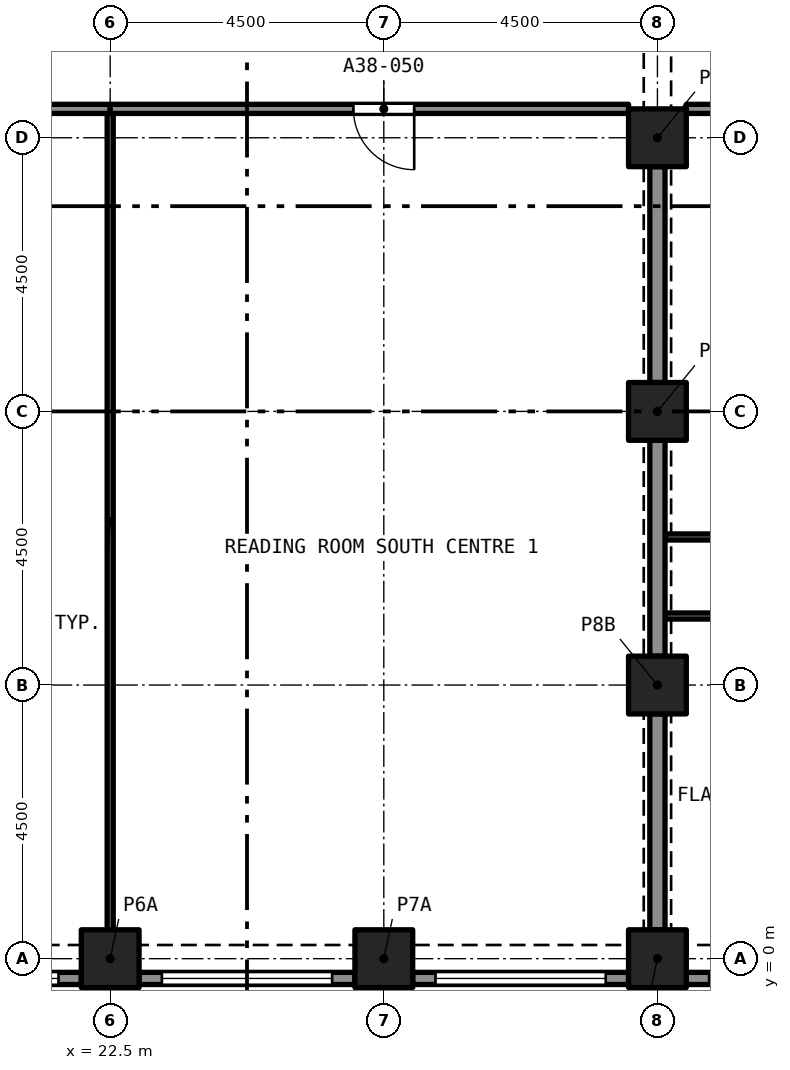
"""IFC4 building model, lengths in metres.
Left out: names, types, materials, properties, quantities, classifications, styles, units other than length and angle.
Written with IfcOpenShell. Run it as: python <this file> out.ifc"""

import sys

from ifc_helpers import new_model, si_unit, direction, frame, frame_2d, origin, origin_2d, place, context, subcontext, project, spatial, rectangle, extrude, element, fill, save


model = new_model("IFC4")
c1 = context("Model", 3, precision=1e-05, world=origin(), true_north=direction((0.0, 1.0)))
c2 = subcontext(c1, "Body", "Model", "MODEL_VIEW")
j1 = project(units=[si_unit("LENGTHUNIT", "METRE"), si_unit("PLANEANGLEUNIT", "RADIAN")], contexts=[c1])
p1 = place(None, origin())
s1 = spatial("IfcSite", under=j1, at=p1, CompositionType="ELEMENT")
p2 = place(p1, origin())
s2 = spatial("IfcBuilding", under=s1, at=p2, CompositionType="ELEMENT")
p3 = place(p2, frame((0.0, 0.0, 136.6)))
s3 = spatial("IfcBuildingStorey", under=s2, at=p3, CompositionType="ELEMENT", Elevation=136.6)
for number, where, z_axis, x_axis in (
    (1, (22.5, 0.0, 0.0), (0.0, 0.0, 1.0), (1.0, 0.0, 0.0)),
    (2, (27.0, 0.0, 0.0), (0.0, 0.0, 1.0), (1.0, 0.0, 0.0)),
    (3, (31.5, 0.0, 0.0), (0.0, 0.0, 1.0), (1.0, 0.0, 0.0)),
    (4, (31.5, 4.5, 0.0), (0.0, 0.0, 1.0), (1.0, 0.0, 0.0)),
    (5, (31.5, 9.0, 0.0), (0.0, 0.0, 1.0), (1.0, 0.0, 0.0)),
    (6, (31.5, 13.5, 0.0), (0.0, 0.0, 1.0), (1.0, 0.0, 0.0)),
):
    element("IfcColumn", number, at=place(p3, frame(where, z_axis=z_axis, x_axis=x_axis)), inside=s3, PredefinedType="COLUMN", context=c2, shape_type="SweptSolid", body=[
        extrude(rectangle(XDim=0.95, YDim=0.95, at=origin_2d()), origin(), (0.0, 0.0, 1.0), 3.2),
    ])
p4 = place(p3, frame((22.025, -0.325, 0.0), z_axis=(0.0, 0.0, 1.0), x_axis=(-1.0, 0.0, 0.0)))
e7 = element("IfcWall", 7, at=p4, inside=s3, PredefinedType="SOLIDWALL", context=c2, shape_type="SweptSolid", body=[
    extrude(rectangle(XDim=3.55, YDim=0.2, at=frame_2d((1.775, 0.0))), origin(), (0.0, 0.0, 1.0), 3.2),
])
p5 = place(p4, frame((0.375, 0.0, 0.45)))
e8 = element("IfcOpeningElement", 8, at=p5, cuts=e7, PredefinedType="OPENING", context=c2, shape_type="SweptSolid", body=[
    extrude(rectangle(XDim=2.8, YDim=1.95, at=frame_2d((1.4, 0.975))), frame((0.0, 0.11, 0.0), z_axis=(0.0, -1.0, 0.0), x_axis=(1.0, 0.0, 0.0)), (0.0, 0.0, 1.0), 0.22),
])
p6 = place(p3, frame((26.525, -0.325, 0.0), z_axis=(0.0, 0.0, 1.0), x_axis=(-1.0, 0.0, 0.0)))
e9 = element("IfcWall", 9, at=p6, inside=s3, PredefinedType="SOLIDWALL", context=c2, shape_type="SweptSolid", body=[
    extrude(rectangle(XDim=3.55, YDim=0.2, at=frame_2d((1.775, 0.0))), origin(), (0.0, 0.0, 1.0), 3.2),
])
p7 = place(p6, frame((0.375, 0.0, 0.45)))
e10 = element("IfcOpeningElement", 10, at=p7, cuts=e9, PredefinedType="OPENING", context=c2, shape_type="SweptSolid", body=[
    extrude(rectangle(XDim=2.8, YDim=1.95, at=frame_2d((1.4, 0.975))), frame((0.0, 0.11, 0.0), z_axis=(0.0, -1.0, 0.0), x_axis=(1.0, 0.0, 0.0)), (0.0, 0.0, 1.0), 0.22),
])
p8 = place(p3, frame((31.025, -0.325, 0.0), z_axis=(0.0, 0.0, 1.0), x_axis=(-1.0, 0.0, 0.0)))
e11 = element("IfcWall", 11, at=p8, inside=s3, PredefinedType="SOLIDWALL", context=c2, shape_type="SweptSolid", body=[
    extrude(rectangle(XDim=3.55, YDim=0.2, at=frame_2d((1.775, 0.0))), origin(), (0.0, 0.0, 1.0), 3.2),
])
p9 = place(p8, frame((0.375, 0.0, 0.45)))
e12 = element("IfcOpeningElement", 12, at=p9, cuts=e11, PredefinedType="OPENING", context=c2, shape_type="SweptSolid", body=[
    extrude(rectangle(XDim=2.8, YDim=1.95, at=frame_2d((1.4, 0.975))), frame((0.0, 0.11, 0.0), z_axis=(0.0, -1.0, 0.0), x_axis=(1.0, 0.0, 0.0)), (0.0, 0.0, 1.0), 0.22),
])
p10 = place(p3, frame((35.525, -0.325, 0.0), z_axis=(0.0, 0.0, 1.0), x_axis=(-1.0, 0.0, 0.0)))
e13 = element("IfcWall", 13, at=p10, inside=s3, PredefinedType="SOLIDWALL", context=c2, shape_type="SweptSolid", body=[
    extrude(rectangle(XDim=3.55, YDim=0.2, at=frame_2d((1.775, 0.0))), origin(), (0.0, 0.0, 1.0), 3.2),
])
p11 = place(p10, frame((0.375, 0.0, 0.45)))
e14 = element("IfcOpeningElement", 14, at=p11, cuts=e13, PredefinedType="OPENING", context=c2, shape_type="SweptSolid", body=[
    extrude(rectangle(XDim=2.8, YDim=1.95, at=frame_2d((1.4, 0.975))), frame((0.0, 0.11, 0.0), z_axis=(0.0, -1.0, 0.0), x_axis=(1.0, 0.0, 0.0)), (0.0, 0.0, 1.0), 0.22),
])
p12 = place(p3, frame((31.625, 6.935, 0.0), z_axis=(0.0, 0.0, 1.0), x_axis=(1.0, 0.0, 0.0)))
e15 = element("IfcWall", 15, at=p12, inside=s3, PredefinedType="PARTITIONING", context=c2, shape_type="SweptSolid", body=[
    extrude(rectangle(XDim=3.486, YDim=0.1, at=frame_2d((1.743, 0.0))), origin(), (0.0, 0.0, 1.0), 2.9),
])
p13 = place(p12, frame((1.23, 0.0, 0.0)))
e16 = element("IfcOpeningElement", 16, at=p13, cuts=e15, PredefinedType="OPENING", context=c2, shape_type="SweptSolid", body=[
    extrude(rectangle(XDim=0.9, YDim=2.1, at=frame_2d((0.45, 1.05))), frame((0.0, 0.06, 0.0), z_axis=(0.0, -1.0, 0.0), x_axis=(1.0, 0.0, 0.0)), (0.0, 0.0, 1.0), 0.12),
])
p14 = place(p3, frame((36.0, 5.635, 0.0), z_axis=(0.0, 0.0, 1.0), x_axis=(-1.0, 0.0, 0.0)))
e17 = element("IfcWall", 17, at=p14, inside=s3, PredefinedType="PARTITIONING", context=c2, shape_type="SweptSolid", body=[
    extrude(rectangle(XDim=4.375, YDim=0.1, at=frame_2d((2.188, 0.0))), origin(), (0.0, 0.0, 1.0), 2.9),
])
p15 = place(p14, frame((1.75, 0.0, 0.0)))
e18 = element("IfcOpeningElement", 18, at=p15, cuts=e17, PredefinedType="OPENING", context=c2, shape_type="SweptSolid", body=[
    extrude(rectangle(XDim=1.0, YDim=2.1, at=frame_2d((0.5, 1.05))), frame((0.0, 0.06, 0.0), z_axis=(0.0, -1.0, 0.0), x_axis=(1.0, 0.0, 0.0)), (0.0, 0.0, 1.0), 0.12),
])
p16 = place(p3, frame((31.5, 9.475, 0.0), z_axis=(0.0, 0.0, 1.0), x_axis=(0.0, 1.0, 0.0)))
e19 = element("IfcWall", 19, at=p16, inside=s3, PredefinedType="PARTITIONING", context=c2, shape_type="SweptSolid", body=[
    extrude(rectangle(XDim=3.55, YDim=0.25, at=frame_2d((1.775, 0.0))), origin(), (0.0, 0.0, 1.0), 2.38),
])
p17 = place(p3, frame((31.975, 13.975, 0.0), z_axis=(0.0, 0.0, 1.0), x_axis=(1.0, 0.0, 0.0)))
e20 = element("IfcWall", 20, at=p17, inside=s3, PredefinedType="PARTITIONING", context=c2, shape_type="SweptSolid", body=[
    extrude(rectangle(XDim=5.675, YDim=0.15, at=frame_2d((2.837, 0.0))), origin(), (0.0, 0.0, 1.0), 2.9),
])
for number, where, z_axis, x_axis in (
    (21, (31.5, 0.475, 0.0), (0.0, 0.0, 1.0), (0.0, 1.0, 0.0)),
    (22, (31.5, 4.975, 0.0), (0.0, 0.0, 1.0), (0.0, 1.0, 0.0)),
):
    element("IfcWall", number, at=place(p3, frame(where, z_axis=z_axis, x_axis=x_axis)), inside=s3, PredefinedType="PARTITIONING", context=c2, shape_type="SweptSolid", body=[
        extrude(rectangle(XDim=3.55, YDim=0.25, at=frame_2d((1.775, 0.0))), origin(), (0.0, 0.0, 1.0), 2.38),
    ])
p18 = place(p3, frame((22.5, 0.475, 0.0), z_axis=(0.0, 0.0, 1.0), x_axis=(0.0, 1.0, 0.0)))
e23 = element("IfcWall", 23, at=p18, inside=s3, PredefinedType="PARTITIONING", context=c2, shape_type="SweptSolid", body=[
    extrude(rectangle(XDim=13.425, YDim=0.1, at=frame_2d((6.712, 0.0))), origin(), (0.0, 0.0, 1.0), 2.75),
])
p19 = place(p3, frame((22.5, 13.975, 0.0), z_axis=(0.0, 0.0, 1.0), x_axis=(-1.0, 0.0, 0.0)))
e24 = element("IfcWall", 24, at=p19, inside=s3, PredefinedType="PARTITIONING", context=c2, shape_type="SweptSolid", body=[
    extrude(rectangle(XDim=4.025, YDim=0.15, at=frame_2d((2.012, 0.0))), origin(), (0.0, 0.0, 1.0), 2.75),
])
p20 = place(p19, frame((1.75, 0.0, 0.0)))
e25 = element("IfcOpeningElement", 25, at=p20, cuts=e24, PredefinedType="OPENING", context=c2, shape_type="SweptSolid", body=[
    extrude(rectangle(XDim=1.0, YDim=2.1, at=frame_2d((0.5, 1.05))), frame((0.0, 0.085, 0.0), z_axis=(0.0, -1.0, 0.0), x_axis=(1.0, 0.0, 0.0)), (0.0, 0.0, 1.0), 0.17),
])
p21 = place(p3, frame((31.025, 13.975, 0.0), z_axis=(0.0, 0.0, 1.0), x_axis=(-1.0, 0.0, 0.0)))
e26 = element("IfcWall", 26, at=p21, inside=s3, PredefinedType="PARTITIONING", context=c2, shape_type="SweptSolid", body=[
    extrude(rectangle(XDim=8.525, YDim=0.15, at=frame_2d((4.262, 0.0))), origin(), (0.0, 0.0, 1.0), 2.75),
])
p22 = place(p21, frame((3.525, 0.0, 0.0)))
e27 = element("IfcOpeningElement", 27, at=p22, cuts=e26, PredefinedType="OPENING", context=c2, shape_type="SweptSolid", body=[
    extrude(rectangle(XDim=1.0, YDim=2.1, at=frame_2d((0.5, 1.05))), frame((0.0, 0.085, 0.0), z_axis=(0.0, -1.0, 0.0), x_axis=(1.0, 0.0, 0.0)), (0.0, 0.0, 1.0), 0.17),
])
p23 = place(p5, origin())
e28 = element("IfcWindow", 28, at=p23, inside=s3, PartitioningType="SINGLE_PANEL", PredefinedType="WINDOW", context=c2, shape_type="SweptSolid", body=[
    extrude(rectangle(XDim=2.8, YDim=1.95, at=frame_2d((1.4, 0.975))), frame((0.0, 0.03, 0.0), z_axis=(0.0, -1.0, 0.0), x_axis=(1.0, 0.0, 0.0)), (0.0, 0.0, 1.0), 0.06),
])
fill(e8, e28)
p24 = place(p7, origin())
e29 = element("IfcWindow", 29, at=p24, inside=s3, PartitioningType="SINGLE_PANEL", PredefinedType="WINDOW", context=c2, shape_type="SweptSolid", body=[
    extrude(rectangle(XDim=2.8, YDim=1.95, at=frame_2d((1.4, 0.975))), frame((0.0, 0.03, 0.0), z_axis=(0.0, -1.0, 0.0), x_axis=(1.0, 0.0, 0.0)), (0.0, 0.0, 1.0), 0.06),
])
fill(e10, e29)
p25 = place(p9, origin())
e30 = element("IfcWindow", 30, at=p25, inside=s3, PartitioningType="SINGLE_PANEL", PredefinedType="WINDOW", context=c2, shape_type="SweptSolid", body=[
    extrude(rectangle(XDim=2.8, YDim=1.95, at=frame_2d((1.4, 0.975))), frame((0.0, 0.03, 0.0), z_axis=(0.0, -1.0, 0.0), x_axis=(1.0, 0.0, 0.0)), (0.0, 0.0, 1.0), 0.06),
])
fill(e12, e30)
p26 = place(p11, origin())
e31 = element("IfcWindow", 31, at=p26, inside=s3, PartitioningType="SINGLE_PANEL", PredefinedType="WINDOW", context=c2, shape_type="SweptSolid", body=[
    extrude(rectangle(XDim=2.8, YDim=1.95, at=frame_2d((1.4, 0.975))), frame((0.0, 0.03, 0.0), z_axis=(0.0, -1.0, 0.0), x_axis=(1.0, 0.0, 0.0)), (0.0, 0.0, 1.0), 0.06),
])
fill(e14, e31)
p27 = place(p22, origin())
e32 = element("IfcDoor", 32, at=p27, inside=s3, OperationType="SINGLE_SWING_LEFT", PredefinedType="DOOR", context=c2, shape_type="SweptSolid", body=[
    extrude(rectangle(XDim=1.0, YDim=2.1, at=frame_2d((0.5, 1.05))), frame((0.0, 0.025, 0.0), z_axis=(0.0, -1.0, 0.0), x_axis=(1.0, 0.0, 0.0)), (0.0, 0.0, 1.0), 0.05),
])
fill(e27, e32)
save(model, sys.argv[1])
